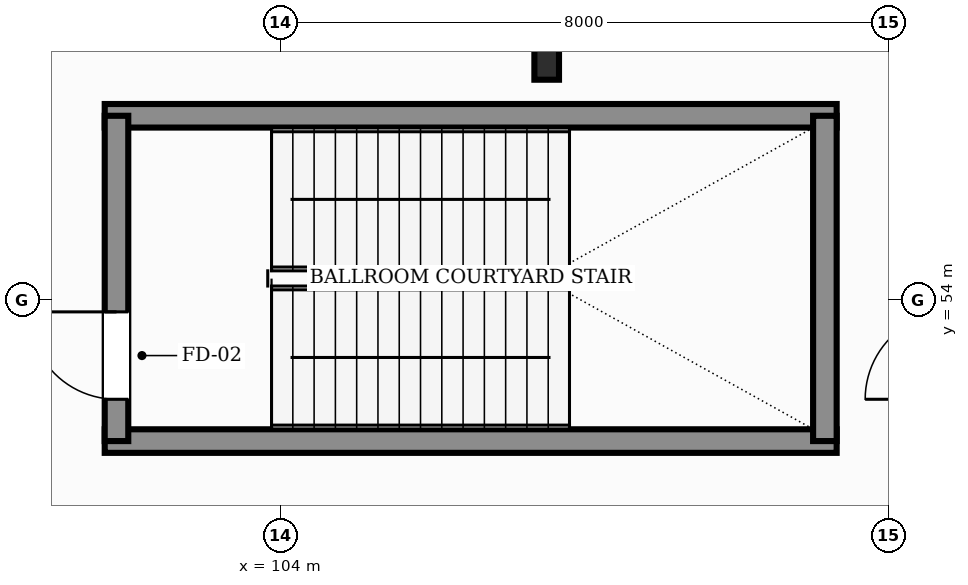
"""IFC4 building model, lengths in metres.
Left out: names, types, materials, properties, quantities, classifications, styles, units other than length and angle.
Written with IfcOpenShell. Run it as: python <this file> out.ifc"""

import sys

from ifc_helpers import new_model, si_unit, direction, frame, frame_2d, origin, origin_2d, place, context, subcontext, project, spatial, rectangle, i_section, extrude, element, fill, save


model = new_model("IFC4")
c1 = context("Model", 3, precision=1e-05, world=origin(), true_north=direction((0.0, 1.0)))
c2 = subcontext(c1, "Body", "Model", "MODEL_VIEW")
j1 = project(units=[si_unit("LENGTHUNIT", "METRE"), si_unit("PLANEANGLEUNIT", "RADIAN")], contexts=[c1])
p1 = place(None, origin())
s1 = spatial("IfcSite", under=j1, at=p1, CompositionType="ELEMENT")
p2 = place(p1, origin())
s2 = spatial("IfcBuilding", under=s1, at=p2, CompositionType="ELEMENT")
p3 = place(p2, frame((0.0, 0.0, 6.0)))
s3 = spatial("IfcBuildingStorey", under=s2, at=p3, CompositionType="ELEMENT", Elevation=6.0)
p4 = place(p3, frame((107.5, 57.2, 0.0), z_axis=(0.0, 0.0, 1.0), x_axis=(1.0, 0.0, 0.0)))
e1 = element("IfcColumn", 1, at=p4, inside=s3, PredefinedType="COLUMN", context=c2, shape_type="SweptSolid", body=[
    extrude(i_section(OverallWidth=0.324, OverallDepth=0.611, WebThickness=0.013, FlangeThickness=0.019, FilletRadius=0.013, at=origin_2d()), origin(), (0.0, 0.0, 1.0), 5.4),
])
for number, where, z_axis, x_axis in (
    (2, (101.685, 52.14, 0.0), (0.0, 0.0, 1.0), (1.0, 0.0, 0.0)),
    (3, (101.685, 56.42, 0.0), (0.0, 0.0, 1.0), (1.0, 0.0, 0.0)),
):
    element("IfcWall", number, at=place(p3, frame(where, z_axis=z_axis, x_axis=x_axis)), inside=s3, PredefinedType="SHEAR", context=c2, shape_type="SweptSolid", body=[
        extrude(rectangle(XDim=9.63, YDim=0.31, at=frame_2d((4.815, 0.0))), origin(), (0.0, 0.0, 1.0), 5.4),
    ])
p5 = place(p3, frame((101.84, 52.14, 0.0), z_axis=(0.0, 0.0, 1.0), x_axis=(0.0, 1.0, 0.0)))
e4 = element("IfcWall", 4, at=p5, inside=s3, PredefinedType="SHEAR", context=c2, shape_type="SweptSolid", body=[
    extrude(rectangle(XDim=4.28, YDim=0.31, at=frame_2d((2.14, 0.0))), origin(), (0.0, 0.0, 1.0), 5.4),
])
p6 = place(p5, frame((0.55, 0.0, 0.0)))
e5 = element("IfcOpeningElement", 5, at=p6, cuts=e4, PredefinedType="OPENING", context=c2, shape_type="SweptSolid", body=[
    extrude(rectangle(XDim=1.15, YDim=2.2, at=frame_2d((0.575, 1.1))), frame((0.0, 0.165, 0.0), z_axis=(0.0, -1.0, 0.0), x_axis=(1.0, 0.0, 0.0)), (0.0, 0.0, 1.0), 0.33),
])
p7 = place(p3, frame((111.16, 52.14, 0.0), z_axis=(0.0, 0.0, 1.0), x_axis=(0.0, 1.0, 0.0)))
e6 = element("IfcWall", 6, at=p7, inside=s3, PredefinedType="SHEAR", context=c2, shape_type="SweptSolid", body=[
    extrude(rectangle(XDim=4.28, YDim=0.31, at=frame_2d((2.14, 0.0))), origin(), (0.0, 0.0, 1.0), 5.4),
])
p8 = place(p6, origin())
e7 = element("IfcDoor", 7, at=p8, inside=s3, OperationType="SINGLE_SWING_RIGHT", PredefinedType="DOOR", context=c2, shape_type="SweptSolid", body=[
    extrude(rectangle(XDim=1.15, YDim=2.2, at=frame_2d((0.575, 1.1))), frame((0.0, 0.025, 0.0), z_axis=(0.0, -1.0, 0.0), x_axis=(1.0, 0.0, 0.0)), (0.0, 0.0, 1.0), 0.05),
])
fill(e5, e7)
save(model, sys.argv[1])
